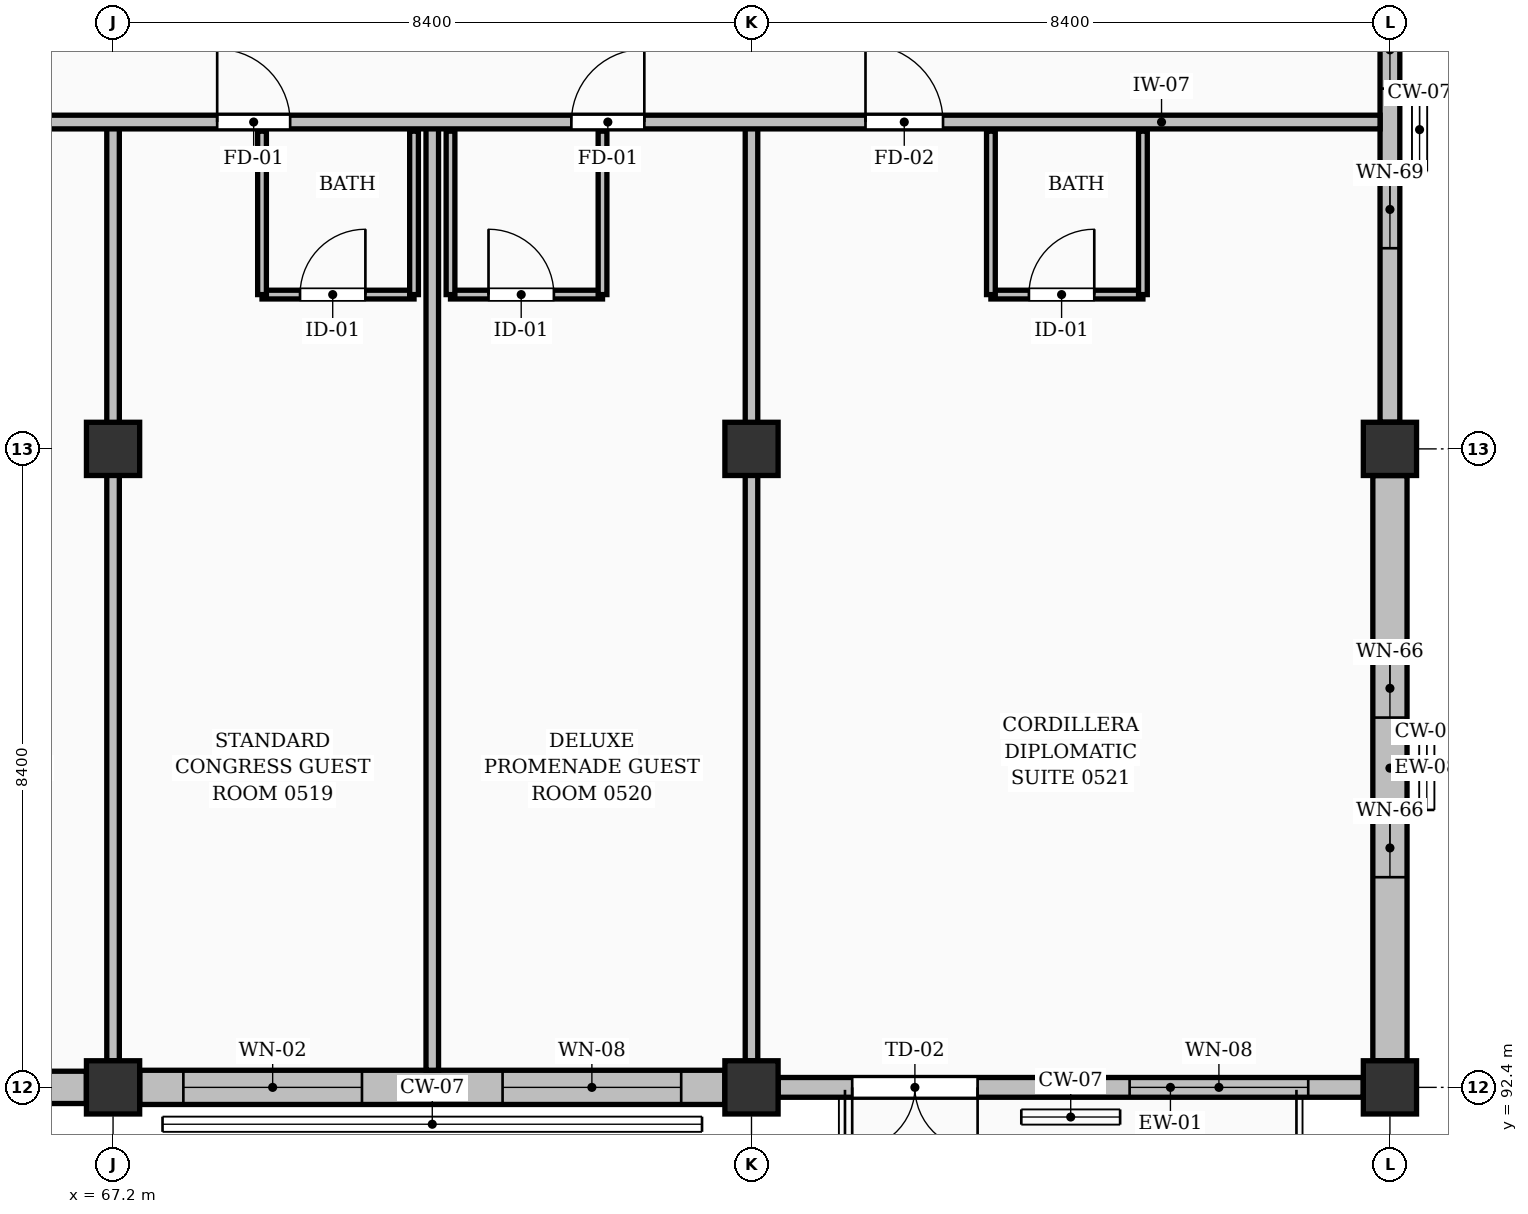
"""IFC4 building model, lengths in metres.
Left out: names, types, materials, properties, quantities, classifications, styles, units other than length and angle.
Written with IfcOpenShell. Run it as: python <this file> out.ifc"""

import sys

from ifc_helpers import new_model, si_unit, direction, frame, frame_2d, origin, origin_2d, place, context, subcontext, project, spatial, rectangle, extrude, element, fill, save


model = new_model("IFC4")
c1 = context("Model", 3, precision=1e-05, world=origin(), true_north=direction((0.0, 1.0)))
c2 = subcontext(c1, "Body", "Model", "MODEL_VIEW")
j1 = project(units=[si_unit("LENGTHUNIT", "METRE"), si_unit("PLANEANGLEUNIT", "RADIAN")], contexts=[c1])
p1 = place(None, origin())
s1 = spatial("IfcSite", under=j1, at=p1, CompositionType="ELEMENT")
p2 = place(p1, origin())
s2 = spatial("IfcBuilding", under=s1, at=p2, CompositionType="ELEMENT")
p3 = place(p2, frame((0.0, 0.0, 18.48)))
s3 = spatial("IfcBuildingStorey", under=s2, at=p3, CompositionType="ELEMENT", Elevation=18.48)
for number, where, z_axis, x_axis in (
    (1, (67.2, 92.4, 0.0), (0.0, 0.0, 1.0), (1.0, 0.0, 0.0)),
    (2, (67.2, 100.8, 0.0), (0.0, 0.0, 1.0), (1.0, 0.0, 0.0)),
    (3, (75.6, 92.4, 0.0), (0.0, 0.0, 1.0), (1.0, 0.0, 0.0)),
    (4, (75.6, 100.8, 0.0), (0.0, 0.0, 1.0), (1.0, 0.0, 0.0)),
    (5, (84.0, 92.4, 0.0), (0.0, 0.0, 1.0), (1.0, 0.0, 0.0)),
    (6, (84.0, 100.8, 0.0), (0.0, 0.0, 1.0), (1.0, 0.0, 0.0)),
):
    element("IfcColumn", number, at=place(p3, frame(where, z_axis=z_axis, x_axis=x_axis)), inside=s3, PredefinedType="COLUMN", context=c2, shape_type="SweptSolid", body=[
        extrude(rectangle(XDim=0.7, YDim=0.7, at=origin_2d()), origin(), (0.0, 0.0, 1.0), 3.36),
    ])
p4 = place(p3, frame((59.151, 92.4, 0.0), z_axis=(0.0, 0.0, 1.0), x_axis=(1.0, 0.0, 0.0)))
e7 = element("IfcWall", 7, at=p4, inside=s3, PredefinedType="SOLIDWALL", context=c2, shape_type="SweptSolid", body=[
    extrude(rectangle(XDim=7.698, YDim=0.425, at=frame_2d((3.849, 0.0))), origin(), (0.0, 0.0, 1.0), 2.494),
])
p5 = place(p4, frame((1.024, 0.0, 0.0)))
e8 = element("IfcOpeningElement", 8, at=p5, cuts=e7, PredefinedType="OPENING", context=c2, shape_type="SweptSolid", body=[
    extrude(rectangle(XDim=1.55, YDim=2.08, at=frame_2d((0.775, 1.04))), frame((0.0, 0.223, 0.0), z_axis=(0.0, -1.0, 0.0), x_axis=(1.0, 0.0, 0.0)), (0.0, 0.0, 1.0), 0.445),
])
p6 = place(p4, frame((4.609, 0.0, 0.25)))
e9 = element("IfcOpeningElement", 9, at=p6, cuts=e7, PredefinedType="OPENING", context=c2, shape_type="SweptSolid", body=[
    extrude(rectangle(XDim=2.38, YDim=2.0, at=frame_2d((1.19, 1.0))), frame((0.0, 0.223, 0.0), z_axis=(0.0, -1.0, 0.0), x_axis=(1.0, 0.0, 0.0)), (0.0, 0.0, 1.0), 0.445),
])
p7 = place(p3, frame((67.551, 92.4, 0.0), z_axis=(0.0, 0.0, 1.0), x_axis=(1.0, 0.0, 0.0)))
e10 = element("IfcWall", 10, at=p7, inside=s3, PredefinedType="SOLIDWALL", context=c2, shape_type="SweptSolid", body=[
    extrude(rectangle(XDim=7.698, YDim=0.45, at=frame_2d((3.849, 0.0))), origin(), (0.0, 0.0, 1.0), 2.414),
])
p8 = place(p7, frame((0.574, 0.0, 0.25)))
e11 = element("IfcOpeningElement", 11, at=p8, cuts=e10, PredefinedType="OPENING", context=c2, shape_type="SweptSolid", body=[
    extrude(rectangle(XDim=2.35, YDim=1.85, at=frame_2d((1.175, 0.925))), frame((0.0, 0.235, 0.0), z_axis=(0.0, -1.0, 0.0), x_axis=(1.0, 0.0, 0.0)), (0.0, 0.0, 1.0), 0.47),
])
p9 = place(p7, frame((4.774, 0.0, 0.25)))
e12 = element("IfcOpeningElement", 12, at=p9, cuts=e10, PredefinedType="OPENING", context=c2, shape_type="SweptSolid", body=[
    extrude(rectangle(XDim=2.35, YDim=1.95, at=frame_2d((1.175, 0.975))), frame((0.0, 0.235, 0.0), z_axis=(0.0, -1.0, 0.0), x_axis=(1.0, 0.0, 0.0)), (0.0, 0.0, 1.0), 0.47),
])
p10 = place(p3, frame((75.951, 92.4, 0.0), z_axis=(0.0, 0.0, 1.0), x_axis=(1.0, 0.0, 0.0)))
e13 = element("IfcWall", 13, at=p10, inside=s3, PredefinedType="SOLIDWALL", context=c2, shape_type="SweptSolid", body=[
    extrude(rectangle(XDim=7.698, YDim=0.26, at=frame_2d((3.849, 0.0))), origin(), (0.0, 0.0, 1.0), 2.414),
])
p11 = place(p10, frame((0.974, 0.0, 0.0)))
e14 = element("IfcOpeningElement", 14, at=p11, cuts=e13, PredefinedType="OPENING", context=c2, shape_type="SweptSolid", body=[
    extrude(rectangle(XDim=1.65, YDim=2.08, at=frame_2d((0.825, 1.04))), frame((0.0, 0.14, 0.0), z_axis=(0.0, -1.0, 0.0), x_axis=(1.0, 0.0, 0.0)), (0.0, 0.0, 1.0), 0.28),
])
p12 = place(p10, frame((4.624, 0.0, 0.25)))
e15 = element("IfcOpeningElement", 15, at=p12, cuts=e13, PredefinedType="OPENING", context=c2, shape_type="SweptSolid", body=[
    extrude(rectangle(XDim=2.35, YDim=1.95, at=frame_2d((1.175, 0.975))), frame((0.0, 0.14, 0.0), z_axis=(0.0, -1.0, 0.0), x_axis=(1.0, 0.0, 0.0)), (0.0, 0.0, 1.0), 0.28),
])
p13 = place(p3, frame((84.0, 92.751, 0.0), z_axis=(0.0, 0.0, 1.0), x_axis=(0.0, 1.0, 0.0)))
e16 = element("IfcWall", 16, at=p13, inside=s3, PredefinedType="SOLIDWALL", context=c2, shape_type="SweptSolid", body=[
    extrude(rectangle(XDim=7.698, YDim=0.45, at=frame_2d((3.849, 0.0))), origin(), (0.0, 0.0, 1.0), 2.414),
])
p14 = place(p13, frame((2.414, 0.0, 0.3)))
e17 = element("IfcOpeningElement", 17, at=p14, cuts=e16, PredefinedType="OPENING", context=c2, shape_type="SweptSolid", body=[
    extrude(rectangle(XDim=0.77, YDim=1.9, at=frame_2d((0.385, 0.95))), frame((0.0, 0.235, 0.0), z_axis=(0.0, -1.0, 0.0), x_axis=(1.0, 0.0, 0.0)), (0.0, 0.0, 1.0), 0.47),
])
p15 = place(p13, frame((4.514, 0.0, 0.3)))
e18 = element("IfcOpeningElement", 18, at=p15, cuts=e16, PredefinedType="OPENING", context=c2, shape_type="SweptSolid", body=[
    extrude(rectangle(XDim=0.77, YDim=1.9, at=frame_2d((0.385, 0.95))), frame((0.0, 0.235, 0.0), z_axis=(0.0, -1.0, 0.0), x_axis=(1.0, 0.0, 0.0)), (0.0, 0.0, 1.0), 0.47),
])
p16 = place(p3, frame((84.0, 101.151, 0.0), z_axis=(0.0, 0.0, 1.0), x_axis=(0.0, 1.0, 0.0)))
e19 = element("IfcWall", 19, at=p16, inside=s3, PredefinedType="SOLIDWALL", context=c2, shape_type="SweptSolid", body=[
    extrude(rectangle(XDim=7.698, YDim=0.26, at=frame_2d((3.849, 0.0))), origin(), (0.0, 0.0, 1.0), 2.414),
])
p17 = place(p16, frame((2.289, 0.0, 0.3)))
e20 = element("IfcOpeningElement", 20, at=p17, cuts=e19, PredefinedType="OPENING", context=c2, shape_type="SweptSolid", body=[
    extrude(rectangle(XDim=1.02, YDim=1.9, at=frame_2d((0.51, 0.95))), frame((0.0, 0.14, 0.0), z_axis=(0.0, -1.0, 0.0), x_axis=(1.0, 0.0, 0.0)), (0.0, 0.0, 1.0), 0.28),
])
p18 = place(p16, frame((4.389, 0.0, 0.3)))
e21 = element("IfcOpeningElement", 21, at=p18, cuts=e19, PredefinedType="OPENING", context=c2, shape_type="SweptSolid", body=[
    extrude(rectangle(XDim=1.02, YDim=1.9, at=frame_2d((0.51, 0.95))), frame((0.0, 0.14, 0.0), z_axis=(0.0, -1.0, 0.0), x_axis=(1.0, 0.0, 0.0)), (0.0, 0.0, 1.0), 0.28),
])
p19 = place(p3, frame((69.16, 102.83, 0.0), z_axis=(0.0, 0.0, 1.0), x_axis=(1.0, 0.0, 0.0)))
e22 = element("IfcWall", 22, at=p19, inside=s3, PredefinedType="PARTITIONING", context=c2, shape_type="SweptSolid", body=[
    extrude(rectangle(XDim=2.0, YDim=0.115, at=frame_2d((1.0, 0.0))), origin(), (0.0, 0.0, 1.0), 3.12),
])
p20 = place(p19, frame((0.5, 0.0, 0.0)))
e23 = element("IfcOpeningElement", 23, at=p20, cuts=e22, PredefinedType="OPENING", context=c2, shape_type="SweptSolid", body=[
    extrude(rectangle(XDim=0.86, YDim=2.05, at=frame_2d((0.43, 1.025))), frame((0.0, 0.067, 0.0), z_axis=(0.0, -1.0, 0.0), x_axis=(1.0, 0.0, 0.0)), (0.0, 0.0, 1.0), 0.135),
])
for number, where, z_axis, x_axis in (
    (24, (69.16, 102.83, 0.0), (0.0, 0.0, 1.0), (0.0, 1.0, 0.0)),
    (25, (71.16, 102.83, 0.0), (0.0, 0.0, 1.0), (0.0, 1.0, 0.0)),
):
    element("IfcWall", number, at=place(p3, frame(where, z_axis=z_axis, x_axis=x_axis)), inside=s3, PredefinedType="PARTITIONING", context=c2, shape_type="SweptSolid", body=[
        extrude(rectangle(XDim=2.15, YDim=0.115, at=frame_2d((1.075, 0.0))), origin(), (0.0, 0.0, 1.0), 3.12),
    ])
p21 = place(p3, frame((71.64, 102.83, 0.0), z_axis=(0.0, 0.0, 1.0), x_axis=(1.0, 0.0, 0.0)))
e26 = element("IfcWall", 26, at=p21, inside=s3, PredefinedType="PARTITIONING", context=c2, shape_type="SweptSolid", body=[
    extrude(rectangle(XDim=2.0, YDim=0.115, at=frame_2d((1.0, 0.0))), origin(), (0.0, 0.0, 1.0), 3.12),
])
p22 = place(p21, frame((0.5, 0.0, 0.0)))
e27 = element("IfcOpeningElement", 27, at=p22, cuts=e26, PredefinedType="OPENING", context=c2, shape_type="SweptSolid", body=[
    extrude(rectangle(XDim=0.86, YDim=2.05, at=frame_2d((0.43, 1.025))), frame((0.0, 0.067, 0.0), z_axis=(0.0, -1.0, 0.0), x_axis=(1.0, 0.0, 0.0)), (0.0, 0.0, 1.0), 0.135),
])
for number, where, z_axis, x_axis in (
    (28, (71.64, 102.83, 0.0), (0.0, 0.0, 1.0), (0.0, 1.0, 0.0)),
    (29, (73.64, 102.83, 0.0), (0.0, 0.0, 1.0), (0.0, 1.0, 0.0)),
):
    element("IfcWall", number, at=place(p3, frame(where, z_axis=z_axis, x_axis=x_axis)), inside=s3, PredefinedType="PARTITIONING", context=c2, shape_type="SweptSolid", body=[
        extrude(rectangle(XDim=2.15, YDim=0.115, at=frame_2d((1.075, 0.0))), origin(), (0.0, 0.0, 1.0), 3.12),
    ])
p23 = place(p3, frame((71.4, 92.625, 0.0), z_axis=(0.0, 0.0, 1.0), x_axis=(0.0, 1.0, 0.0)))
e30 = element("IfcWall", 30, at=p23, inside=s3, PredefinedType="PARTITIONING", context=c2, shape_type="SweptSolid", body=[
    extrude(rectangle(XDim=12.475, YDim=0.165, at=frame_2d((6.238, 0.0))), origin(), (0.0, 0.0, 1.0), 3.12),
])
p24 = place(p3, frame((67.2, 92.75, 0.0), z_axis=(0.0, 0.0, 1.0), x_axis=(0.0, 1.0, 0.0)))
e31 = element("IfcWall", 31, at=p24, inside=s3, PredefinedType="PARTITIONING", context=c2, shape_type="SweptSolid", body=[
    extrude(rectangle(XDim=12.35, YDim=0.165, at=frame_2d((6.175, 0.0))), origin(), (0.0, 0.0, 1.0), 2.375),
])
p25 = place(p3, frame((78.75, 102.83, 0.0), z_axis=(0.0, 0.0, 1.0), x_axis=(1.0, 0.0, 0.0)))
e32 = element("IfcWall", 32, at=p25, inside=s3, PredefinedType="PARTITIONING", context=c2, shape_type="SweptSolid", body=[
    extrude(rectangle(XDim=2.0, YDim=0.115, at=frame_2d((1.0, 0.0))), origin(), (0.0, 0.0, 1.0), 3.12),
])
p26 = place(p25, frame((0.5, 0.0, 0.0)))
e33 = element("IfcOpeningElement", 33, at=p26, cuts=e32, PredefinedType="OPENING", context=c2, shape_type="SweptSolid", body=[
    extrude(rectangle(XDim=0.86, YDim=2.05, at=frame_2d((0.43, 1.025))), frame((0.0, 0.067, 0.0), z_axis=(0.0, -1.0, 0.0), x_axis=(1.0, 0.0, 0.0)), (0.0, 0.0, 1.0), 0.135),
])
for number, where, z_axis, x_axis in (
    (34, (78.75, 102.83, 0.0), (0.0, 0.0, 1.0), (0.0, 1.0, 0.0)),
    (35, (80.75, 102.83, 0.0), (0.0, 0.0, 1.0), (0.0, 1.0, 0.0)),
):
    element("IfcWall", number, at=place(p3, frame(where, z_axis=z_axis, x_axis=x_axis)), inside=s3, PredefinedType="PARTITIONING", context=c2, shape_type="SweptSolid", body=[
        extrude(rectangle(XDim=2.15, YDim=0.115, at=frame_2d((1.075, 0.0))), origin(), (0.0, 0.0, 1.0), 3.12),
    ])
p27 = place(p3, frame((75.6, 92.75, 0.0), z_axis=(0.0, 0.0, 1.0), x_axis=(0.0, 1.0, 0.0)))
e36 = element("IfcWall", 36, at=p27, inside=s3, PredefinedType="PARTITIONING", context=c2, shape_type="SweptSolid", body=[
    extrude(rectangle(XDim=12.35, YDim=0.165, at=frame_2d((6.175, 0.0))), origin(), (0.0, 0.0, 1.0), 2.375),
])
p28 = place(p3, frame((54.4, 105.1, 0.0), z_axis=(0.0, 0.0, 1.0), x_axis=(1.0, 0.0, 0.0)))
e37 = element("IfcWall", 37, at=p28, inside=s3, PredefinedType="PARTITIONING", context=c2, shape_type="SweptSolid", body=[
    extrude(rectangle(XDim=29.47, YDim=0.18, at=frame_2d((14.735, 0.0))), origin(), (0.0, 0.0, 1.0), 3.12),
])
p29 = place(p28, frame((2.03, 0.0, 0.0)))
e38 = element("IfcOpeningElement", 38, at=p29, cuts=e37, PredefinedType="OPENING", context=c2, shape_type="SweptSolid", body=[
    extrude(rectangle(XDim=0.96, YDim=2.15, at=frame_2d((0.48, 1.075))), frame((0.0, 0.1, 0.0), z_axis=(0.0, -1.0, 0.0), x_axis=(1.0, 0.0, 0.0)), (0.0, 0.0, 1.0), 0.2),
])
p30 = place(p28, frame((5.77, 0.0, 0.0)))
e39 = element("IfcOpeningElement", 39, at=p30, cuts=e37, PredefinedType="OPENING", context=c2, shape_type="SweptSolid", body=[
    extrude(rectangle(XDim=0.96, YDim=2.15, at=frame_2d((0.48, 1.075))), frame((0.0, 0.1, 0.0), z_axis=(0.0, -1.0, 0.0), x_axis=(1.0, 0.0, 0.0)), (0.0, 0.0, 1.0), 0.2),
])
p31 = place(p28, frame((10.43, 0.0, 0.0)))
e40 = element("IfcOpeningElement", 40, at=p31, cuts=e37, PredefinedType="OPENING", context=c2, shape_type="SweptSolid", body=[
    extrude(rectangle(XDim=0.96, YDim=2.15, at=frame_2d((0.48, 1.075))), frame((0.0, 0.1, 0.0), z_axis=(0.0, -1.0, 0.0), x_axis=(1.0, 0.0, 0.0)), (0.0, 0.0, 1.0), 0.2),
])
p32 = place(p28, frame((14.17, 0.0, 0.0)))
e41 = element("IfcOpeningElement", 41, at=p32, cuts=e37, PredefinedType="OPENING", context=c2, shape_type="SweptSolid", body=[
    extrude(rectangle(XDim=0.96, YDim=2.15, at=frame_2d((0.48, 1.075))), frame((0.0, 0.1, 0.0), z_axis=(0.0, -1.0, 0.0), x_axis=(1.0, 0.0, 0.0)), (0.0, 0.0, 1.0), 0.2),
])
p33 = place(p28, frame((18.83, 0.0, 0.0)))
e42 = element("IfcOpeningElement", 42, at=p33, cuts=e37, PredefinedType="OPENING", context=c2, shape_type="SweptSolid", body=[
    extrude(rectangle(XDim=0.96, YDim=2.15, at=frame_2d((0.48, 1.075))), frame((0.0, 0.1, 0.0), z_axis=(0.0, -1.0, 0.0), x_axis=(1.0, 0.0, 0.0)), (0.0, 0.0, 1.0), 0.2),
])
p34 = place(p28, frame((22.7, 0.0, 0.0)))
e43 = element("IfcOpeningElement", 43, at=p34, cuts=e37, PredefinedType="OPENING", context=c2, shape_type="SweptSolid", body=[
    extrude(rectangle(XDim=1.02, YDim=2.15, at=frame_2d((0.51, 1.075))), frame((0.0, 0.1, 0.0), z_axis=(0.0, -1.0, 0.0), x_axis=(1.0, 0.0, 0.0)), (0.0, 0.0, 1.0), 0.2),
])
p35 = place(p8, origin())
e44 = element("IfcWindow", 44, at=p35, inside=s3, PartitioningType="DOUBLE_PANEL_VERTICAL", PredefinedType="WINDOW", context=c2, shape_type="SweptSolid", body=[
    extrude(rectangle(XDim=2.35, YDim=1.85, at=frame_2d((1.175, 0.925))), frame((0.0, 0.03, 0.0), z_axis=(0.0, -1.0, 0.0), x_axis=(1.0, 0.0, 0.0)), (0.0, 0.0, 1.0), 0.06),
])
fill(e11, e44)
p36 = place(p9, origin())
e45 = element("IfcWindow", 45, at=p36, inside=s3, PartitioningType="DOUBLE_PANEL_VERTICAL", PredefinedType="WINDOW", context=c2, shape_type="SweptSolid", body=[
    extrude(rectangle(XDim=2.35, YDim=1.95, at=frame_2d((1.175, 0.975))), frame((0.0, 0.03, 0.0), z_axis=(0.0, -1.0, 0.0), x_axis=(1.0, 0.0, 0.0)), (0.0, 0.0, 1.0), 0.06),
])
fill(e12, e45)
p37 = place(p11, frame((1.65, 0.0, 0.0), z_axis=(0.0, 0.0, 1.0), x_axis=(-1.0, 0.0, 0.0)))
e46 = element("IfcDoor", 46, at=p37, inside=s3, OperationType="DOUBLE_DOOR_SINGLE_SWING", PredefinedType="DOOR", context=c2, shape_type="SweptSolid", body=[
    extrude(rectangle(XDim=1.65, YDim=2.08, at=frame_2d((0.825, 1.04))), frame((0.0, 0.025, 0.0), z_axis=(0.0, -1.0, 0.0), x_axis=(1.0, 0.0, 0.0)), (0.0, 0.0, 1.0), 0.05),
])
fill(e14, e46)
p38 = place(p12, origin())
e47 = element("IfcWindow", 47, at=p38, inside=s3, PartitioningType="DOUBLE_PANEL_VERTICAL", PredefinedType="WINDOW", context=c2, shape_type="SweptSolid", body=[
    extrude(rectangle(XDim=2.35, YDim=1.95, at=frame_2d((1.175, 0.975))), frame((0.0, 0.03, 0.0), z_axis=(0.0, -1.0, 0.0), x_axis=(1.0, 0.0, 0.0)), (0.0, 0.0, 1.0), 0.06),
])
fill(e15, e47)
p39 = place(p14, origin())
e48 = element("IfcWindow", 48, at=p39, inside=s3, PartitioningType="SINGLE_PANEL", PredefinedType="WINDOW", context=c2, shape_type="SweptSolid", body=[
    extrude(rectangle(XDim=0.77, YDim=1.9, at=frame_2d((0.385, 0.95))), frame((0.0, 0.03, 0.0), z_axis=(0.0, -1.0, 0.0), x_axis=(1.0, 0.0, 0.0)), (0.0, 0.0, 1.0), 0.06),
])
fill(e17, e48)
p40 = place(p15, origin())
e49 = element("IfcWindow", 49, at=p40, inside=s3, PartitioningType="SINGLE_PANEL", PredefinedType="WINDOW", context=c2, shape_type="SweptSolid", body=[
    extrude(rectangle(XDim=0.77, YDim=1.9, at=frame_2d((0.385, 0.95))), frame((0.0, 0.03, 0.0), z_axis=(0.0, -1.0, 0.0), x_axis=(1.0, 0.0, 0.0)), (0.0, 0.0, 1.0), 0.06),
])
fill(e18, e49)
p41 = place(p17, origin())
e50 = element("IfcWindow", 50, at=p41, inside=s3, PartitioningType="SINGLE_PANEL", PredefinedType="WINDOW", context=c2, shape_type="SweptSolid", body=[
    extrude(rectangle(XDim=1.02, YDim=1.9, at=frame_2d((0.51, 0.95))), frame((0.0, 0.03, 0.0), z_axis=(0.0, -1.0, 0.0), x_axis=(1.0, 0.0, 0.0)), (0.0, 0.0, 1.0), 0.06),
])
fill(e20, e50)
p42 = place(p18, origin())
e51 = element("IfcWindow", 51, at=p42, inside=s3, PartitioningType="SINGLE_PANEL", PredefinedType="WINDOW", context=c2, shape_type="SweptSolid", body=[
    extrude(rectangle(XDim=1.02, YDim=1.9, at=frame_2d((0.51, 0.95))), frame((0.0, 0.03, 0.0), z_axis=(0.0, -1.0, 0.0), x_axis=(1.0, 0.0, 0.0)), (0.0, 0.0, 1.0), 0.06),
])
fill(e21, e51)
p43 = place(p20, origin())
e52 = element("IfcDoor", 52, at=p43, inside=s3, OperationType="SINGLE_SWING_RIGHT", PredefinedType="DOOR", context=c2, shape_type="SweptSolid", body=[
    extrude(rectangle(XDim=0.86, YDim=2.05, at=frame_2d((0.43, 1.025))), frame((0.0, 0.025, 0.0), z_axis=(0.0, -1.0, 0.0), x_axis=(1.0, 0.0, 0.0)), (0.0, 0.0, 1.0), 0.05),
])
fill(e23, e52)
p44 = place(p22, origin())
e53 = element("IfcDoor", 53, at=p44, inside=s3, OperationType="SINGLE_SWING_LEFT", PredefinedType="DOOR", context=c2, shape_type="SweptSolid", body=[
    extrude(rectangle(XDim=0.86, YDim=2.05, at=frame_2d((0.43, 1.025))), frame((0.0, 0.025, 0.0), z_axis=(0.0, -1.0, 0.0), x_axis=(1.0, 0.0, 0.0)), (0.0, 0.0, 1.0), 0.05),
])
fill(e27, e53)
p45 = place(p26, origin())
e54 = element("IfcDoor", 54, at=p45, inside=s3, OperationType="SINGLE_SWING_RIGHT", PredefinedType="DOOR", context=c2, shape_type="SweptSolid", body=[
    extrude(rectangle(XDim=0.86, YDim=2.05, at=frame_2d((0.43, 1.025))), frame((0.0, 0.025, 0.0), z_axis=(0.0, -1.0, 0.0), x_axis=(1.0, 0.0, 0.0)), (0.0, 0.0, 1.0), 0.05),
])
fill(e33, e54)
p46 = place(p32, origin())
e55 = element("IfcDoor", 55, at=p46, inside=s3, OperationType="SINGLE_SWING_LEFT", PredefinedType="DOOR", context=c2, shape_type="SweptSolid", body=[
    extrude(rectangle(XDim=0.96, YDim=2.15, at=frame_2d((0.48, 1.075))), frame((0.0, 0.025, 0.0), z_axis=(0.0, -1.0, 0.0), x_axis=(1.0, 0.0, 0.0)), (0.0, 0.0, 1.0), 0.05),
])
fill(e41, e55)
p47 = place(p33, origin())
e56 = element("IfcDoor", 56, at=p47, inside=s3, OperationType="SINGLE_SWING_RIGHT", PredefinedType="DOOR", context=c2, shape_type="SweptSolid", body=[
    extrude(rectangle(XDim=0.96, YDim=2.15, at=frame_2d((0.48, 1.075))), frame((0.0, 0.025, 0.0), z_axis=(0.0, -1.0, 0.0), x_axis=(1.0, 0.0, 0.0)), (0.0, 0.0, 1.0), 0.05),
])
fill(e42, e56)
p48 = place(p34, origin())
e57 = element("IfcDoor", 57, at=p48, inside=s3, OperationType="SINGLE_SWING_LEFT", PredefinedType="DOOR", context=c2, shape_type="SweptSolid", body=[
    extrude(rectangle(XDim=1.02, YDim=2.15, at=frame_2d((0.51, 1.075))), frame((0.0, 0.025, 0.0), z_axis=(0.0, -1.0, 0.0), x_axis=(1.0, 0.0, 0.0)), (0.0, 0.0, 1.0), 0.05),
])
fill(e43, e57)
save(model, sys.argv[1])
